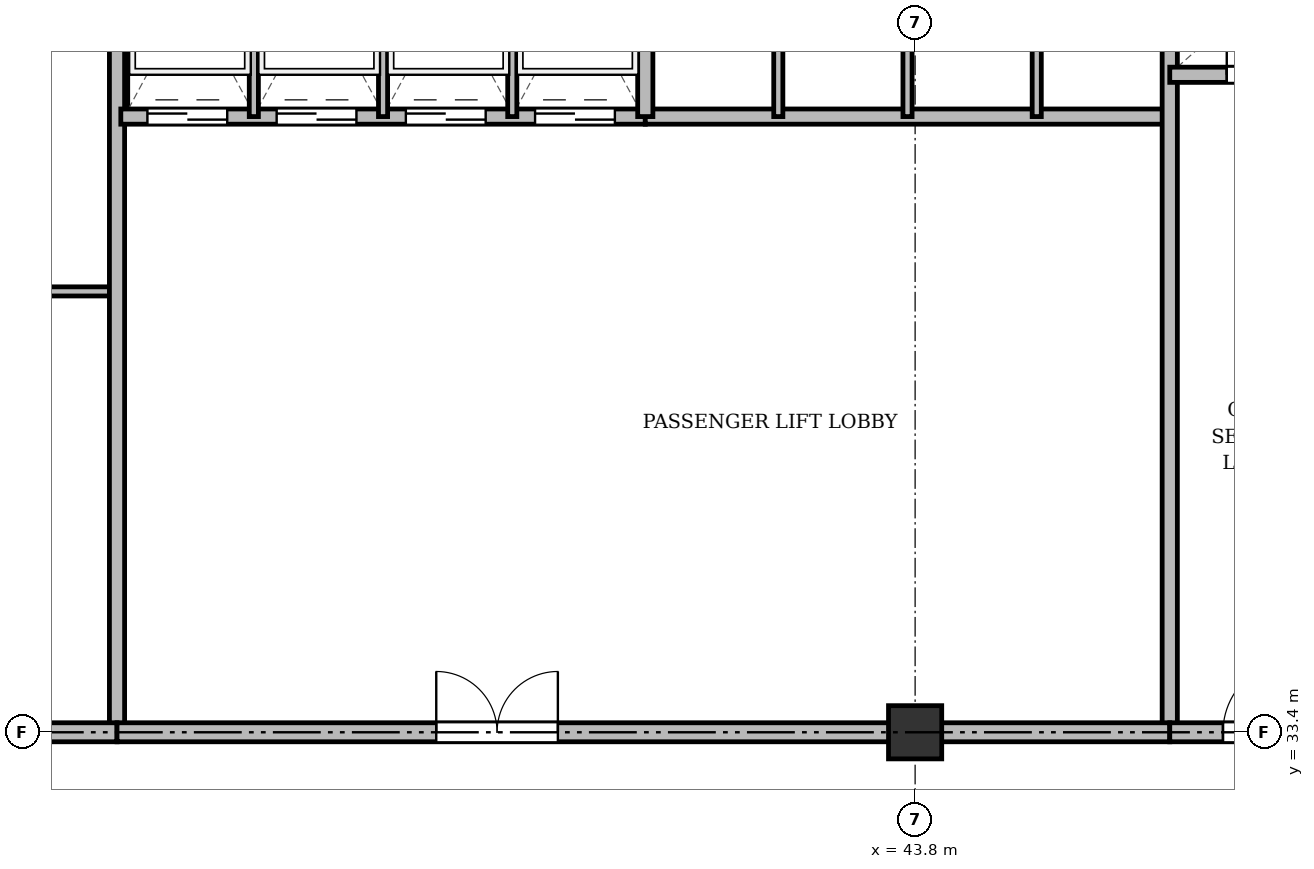
"""IFC4 building model, lengths in metres.
Left out: names, types, materials, properties, quantities, classifications, styles, units other than length and angle.
Written with IfcOpenShell. Run it as: python <this file> out.ifc"""

import sys

from ifc_helpers import new_model, si_unit, direction, frame, frame_2d, origin, origin_2d, place, context, subcontext, project, spatial, rectangle, extrude, source, transform, mapped, element, fill, save


model = new_model("IFC4")
c1 = context("Model", 3, precision=1e-05, world=origin(), true_north=direction((0.0, 1.0)))
c2 = subcontext(c1, "Body", "Model", "MODEL_VIEW")
j1 = project(units=[si_unit("LENGTHUNIT", "METRE"), si_unit("PLANEANGLEUNIT", "RADIAN")], contexts=[c1])
p1 = place(None, origin())
s1 = spatial("IfcSite", under=j1, at=p1, CompositionType="ELEMENT")
p2 = place(p1, origin())
s2 = spatial("IfcBuilding", under=s1, at=p2, CompositionType="ELEMENT")
p3 = place(p2, frame((0.0, 0.0, 135.7)))
s3 = spatial("IfcBuildingStorey", under=s2, at=p3, CompositionType="ELEMENT", Elevation=135.7)
m1 = source(origin(), c2, "Body", "SweptSolid", [
    extrude(rectangle(XDim=0.7, YDim=0.7, at=origin_2d()), origin(), (0.0, 0.0, 1.0), 3.6),
])
p4 = place(p3, frame((43.8, 33.4, 0.0), z_axis=(0.0, 0.0, 1.0), x_axis=(1.0, 0.0, 0.0)))
e1 = element("IfcColumn", 1, at=p4, inside=s3, PredefinedType="COLUMN", context=c2, shape_type="MappedRepresentation", body=[
    mapped(m1, transform((0.0, 0.0, 0.0), x_axis=(1.0, 0.0, 0.0), y_axis=(0.0, 1.0, 0.0), z_axis=(0.0, 0.0, 1.0), scale=1.0)),
])
p5 = place(p3, frame((26.3, 39.2, 0.0), z_axis=(0.0, 0.0, 1.0), x_axis=(1.0, 0.0, 0.0)))
e2 = element("IfcWall", 2, at=p5, inside=s3, PredefinedType="PARTITIONING", context=c2, shape_type="SweptSolid", body=[
    extrude(rectangle(XDim=7.0, YDim=0.12, at=frame_2d((3.5, 0.0))), origin(), (0.0, 0.0, 1.0), 2.85),
])
p6 = place(p5, frame((2.6, 0.0, 0.0)))
e3 = element("IfcOpeningElement", 3, at=p6, cuts=e2, PredefinedType="OPENING", context=c2, shape_type="SweptSolid", body=[
    extrude(rectangle(XDim=0.95, YDim=2.15, at=frame_2d((0.475, 1.075))), frame((0.0, 0.07, 0.0), z_axis=(0.0, -1.0, 0.0), x_axis=(1.0, 0.0, 0.0)), (0.0, 0.0, 1.0), 0.14),
])
p7 = place(p3, frame((33.3, 33.4, 0.0), z_axis=(0.0, 0.0, 1.0), x_axis=(0.0, 1.0, 0.0)))
e4 = element("IfcWall", 4, at=p7, inside=s3, PredefinedType="SOLIDWALL", context=c2, shape_type="SweptSolid", body=[
    extrude(rectangle(XDim=11.3, YDim=0.2, at=frame_2d((5.65, 0.0))), origin(), (0.0, 0.0, 1.0), 2.75),
])
p8 = place(p3, frame((33.35, 41.5, 0.0), z_axis=(0.0, 0.0, 1.0), x_axis=(1.0, 0.0, 0.0)))
e5 = element("IfcWall", 5, at=p8, inside=s3, PredefinedType="SOLIDWALL", context=c2, shape_type="SweptSolid", body=[
    extrude(rectangle(XDim=6.9, YDim=0.2, at=frame_2d((3.45, 0.0))), origin(), (0.0, 0.0, 1.0), 3.35),
])
p9 = place(p8, frame((0.35, 0.0, 0.0)))
e6 = element("IfcOpeningElement", 6, at=p9, cuts=e5, PredefinedType="OPENING", context=c2, shape_type="SweptSolid", body=[
    extrude(rectangle(XDim=1.05, YDim=2.15, at=frame_2d((0.525, 1.075))), frame((0.0, 0.11, 0.0), z_axis=(0.0, -1.0, 0.0), x_axis=(1.0, 0.0, 0.0)), (0.0, 0.0, 1.0), 0.22),
])
p10 = place(p8, frame((2.05, 0.0, 0.0)))
e7 = element("IfcOpeningElement", 7, at=p10, cuts=e5, PredefinedType="OPENING", context=c2, shape_type="SweptSolid", body=[
    extrude(rectangle(XDim=1.05, YDim=2.15, at=frame_2d((0.525, 1.075))), frame((0.0, 0.11, 0.0), z_axis=(0.0, -1.0, 0.0), x_axis=(1.0, 0.0, 0.0)), (0.0, 0.0, 1.0), 0.22),
])
p11 = place(p8, frame((3.75, 0.0, 0.0)))
e8 = element("IfcOpeningElement", 8, at=p11, cuts=e5, PredefinedType="OPENING", context=c2, shape_type="SweptSolid", body=[
    extrude(rectangle(XDim=1.05, YDim=2.15, at=frame_2d((0.525, 1.075))), frame((0.0, 0.11, 0.0), z_axis=(0.0, -1.0, 0.0), x_axis=(1.0, 0.0, 0.0)), (0.0, 0.0, 1.0), 0.22),
])
p12 = place(p8, frame((5.45, 0.0, 0.0)))
e9 = element("IfcOpeningElement", 9, at=p12, cuts=e5, PredefinedType="OPENING", context=c2, shape_type="SweptSolid", body=[
    extrude(rectangle(XDim=1.05, YDim=2.15, at=frame_2d((0.525, 1.075))), frame((0.0, 0.11, 0.0), z_axis=(0.0, -1.0, 0.0), x_axis=(1.0, 0.0, 0.0)), (0.0, 0.0, 1.0), 0.22),
])
for number, where, z_axis, x_axis in (
    (10, (35.1, 41.5, 0.0), (0.0, 0.0, 1.0), (0.0, 1.0, 0.0)),
    (11, (36.8, 41.5, 0.0), (0.0, 0.0, 1.0), (0.0, 1.0, 0.0)),
    (12, (38.5, 41.5, 0.0), (0.0, 0.0, 1.0), (0.0, 1.0, 0.0)),
):
    element("IfcWall", number, at=place(p3, frame(where, z_axis=z_axis, x_axis=x_axis)), inside=s3, PredefinedType="PARTITIONING", context=c2, shape_type="SweptSolid", body=[
        extrude(rectangle(XDim=3.2, YDim=0.12, at=frame_2d((1.6, 0.0))), origin(), (0.0, 0.0, 1.0), 3.35),
    ])
p13 = place(p3, frame((40.25, 41.5, 0.0), z_axis=(0.0, 0.0, 1.0), x_axis=(1.0, 0.0, 0.0)))
e13 = element("IfcWall", 13, at=p13, inside=s3, PredefinedType="SOLIDWALL", context=c2, shape_type="SweptSolid", body=[
    extrude(rectangle(XDim=6.9, YDim=0.2, at=frame_2d((3.45, 0.0))), origin(), (0.0, 0.0, 1.0), 2.85),
])
p14 = place(p3, frame((40.25, 41.5, 0.0), z_axis=(0.0, 0.0, 1.0), x_axis=(0.0, 1.0, 0.0)))
e14 = element("IfcWall", 14, at=p14, inside=s3, PredefinedType="SOLIDWALL", context=c2, shape_type="SweptSolid", body=[
    extrude(rectangle(XDim=3.2, YDim=0.2, at=frame_2d((1.6, 0.0))), origin(), (0.0, 0.0, 1.0), 3.35),
])
p15 = place(p3, frame((42.0, 41.5, 0.0), z_axis=(0.0, 0.0, 1.0), x_axis=(0.0, 1.0, 0.0)))
e15 = element("IfcWall", 15, at=p15, inside=s3, PredefinedType="PARTITIONING", context=c2, shape_type="SweptSolid", body=[
    extrude(rectangle(XDim=3.2, YDim=0.12, at=frame_2d((1.6, 0.0))), origin(), (0.0, 0.0, 1.0), 3.35),
])
p16 = place(p3, frame((43.7, 41.5, 0.0), z_axis=(0.0, 0.0, 1.0), x_axis=(0.0, 1.0, 0.0)))
e16 = element("IfcWall", 16, at=p16, inside=s3, PredefinedType="PARTITIONING", context=c2, shape_type="SweptSolid", body=[
    extrude(rectangle(XDim=3.2, YDim=0.12, at=frame_2d((1.6, 0.0))), origin(), (0.0, 0.0, 1.0), 2.85),
])
p17 = place(p3, frame((45.4, 41.5, 0.0), z_axis=(0.0, 0.0, 1.0), x_axis=(0.0, 1.0, 0.0)))
e17 = element("IfcWall", 17, at=p17, inside=s3, PredefinedType="PARTITIONING", context=c2, shape_type="SweptSolid", body=[
    extrude(rectangle(XDim=3.2, YDim=0.12, at=frame_2d((1.6, 0.0))), origin(), (0.0, 0.0, 1.0), 3.35),
])
p18 = place(p3, frame((47.15, 33.4, 0.0), z_axis=(0.0, 0.0, 1.0), x_axis=(0.0, 1.0, 0.0)))
e18 = element("IfcWall", 18, at=p18, inside=s3, PredefinedType="SOLIDWALL", context=c2, shape_type="SweptSolid", body=[
    extrude(rectangle(XDim=11.3, YDim=0.2, at=frame_2d((5.65, 0.0))), origin(), (0.0, 0.0, 1.0), 2.75),
])
p19 = place(p3, frame((26.3, 33.4, 0.0), z_axis=(0.0, 0.0, 1.0), x_axis=(1.0, 0.0, 0.0)))
e19 = element("IfcWall", 19, at=p19, inside=s3, PredefinedType="PARTITIONING", context=c2, shape_type="SweptSolid", body=[
    extrude(rectangle(XDim=7.0, YDim=0.25, at=frame_2d((3.5, 0.0))), origin(), (0.0, 0.0, 1.0), 2.75),
])
p20 = place(p19, frame((1.35, 0.0, 0.0)))
e20 = element("IfcOpeningElement", 20, at=p20, cuts=e19, PredefinedType="OPENING", context=c2, shape_type="SweptSolid", body=[
    extrude(rectangle(XDim=0.95, YDim=2.15, at=frame_2d((0.475, 1.075))), frame((0.0, 0.135, 0.0), z_axis=(0.0, -1.0, 0.0), x_axis=(1.0, 0.0, 0.0)), (0.0, 0.0, 1.0), 0.27),
])
p21 = place(p3, frame((33.3, 33.4, 0.0), z_axis=(0.0, 0.0, 1.0), x_axis=(1.0, 0.0, 0.0)))
e21 = element("IfcWall", 21, at=p21, inside=s3, PredefinedType="PARTITIONING", context=c2, shape_type="SweptSolid", body=[
    extrude(rectangle(XDim=13.85, YDim=0.25, at=frame_2d((6.925, 0.0))), origin(), (0.0, 0.0, 1.0), 2.75),
])
p22 = place(p21, frame((4.2, 0.0, 0.0)))
e22 = element("IfcOpeningElement", 22, at=p22, cuts=e21, PredefinedType="OPENING", context=c2, shape_type="SweptSolid", body=[
    extrude(rectangle(XDim=1.6, YDim=2.2, at=frame_2d((0.8, 1.1))), frame((0.0, 0.135, 0.0), z_axis=(0.0, -1.0, 0.0), x_axis=(1.0, 0.0, 0.0)), (0.0, 0.0, 1.0), 0.27),
])
p23 = place(p3, frame((47.15, 42.05, 0.0), z_axis=(0.0, 0.0, 1.0), x_axis=(1.0, 0.0, 0.0)))
e23 = element("IfcWall", 23, at=p23, inside=s3, PredefinedType="SOLIDWALL", context=c2, shape_type="SweptSolid", body=[
    extrude(rectangle(XDim=7.85, YDim=0.2, at=frame_2d((3.925, 0.0))), origin(), (0.0, 0.0, 1.0), 2.85),
])
p24 = place(p23, frame((0.75, 0.0, 0.0)))
e24 = element("IfcOpeningElement", 24, at=p24, cuts=e23, PredefinedType="OPENING", context=c2, shape_type="SweptSolid", body=[
    extrude(rectangle(XDim=0.9, YDim=2.1, at=frame_2d((0.45, 1.05))), frame((0.0, 0.11, 0.0), z_axis=(0.0, -1.0, 0.0), x_axis=(1.0, 0.0, 0.0)), (0.0, 0.0, 1.0), 0.22),
])
p25 = place(p23, frame((3.85, 0.0, 0.0)))
e25 = element("IfcOpeningElement", 25, at=p25, cuts=e23, PredefinedType="OPENING", context=c2, shape_type="SweptSolid", body=[
    extrude(rectangle(XDim=0.9, YDim=2.1, at=frame_2d((0.45, 1.05))), frame((0.0, 0.11, 0.0), z_axis=(0.0, -1.0, 0.0), x_axis=(1.0, 0.0, 0.0)), (0.0, 0.0, 1.0), 0.22),
])
p26 = place(p3, frame((47.15, 33.4, 0.0), z_axis=(0.0, 0.0, 1.0), x_axis=(1.0, 0.0, 0.0)))
e26 = element("IfcWall", 26, at=p26, inside=s3, PredefinedType="PARTITIONING", context=c2, shape_type="SweptSolid", body=[
    extrude(rectangle(XDim=11.15, YDim=0.25, at=frame_2d((5.575, 0.0))), origin(), (0.0, 0.0, 1.0), 2.75),
])
p27 = place(p26, frame((0.7, 0.0, 0.0)))
e27 = element("IfcOpeningElement", 27, at=p27, cuts=e26, PredefinedType="OPENING", context=c2, shape_type="SweptSolid", body=[
    extrude(rectangle(XDim=0.95, YDim=2.15, at=frame_2d((0.475, 1.075))), frame((0.0, 0.135, 0.0), z_axis=(0.0, -1.0, 0.0), x_axis=(1.0, 0.0, 0.0)), (0.0, 0.0, 1.0), 0.27),
])
p28 = place(p26, frame((6.0, 0.0, 0.0)))
e28 = element("IfcOpeningElement", 28, at=p28, cuts=e26, PredefinedType="OPENING", context=c2, shape_type="SweptSolid", body=[
    extrude(rectangle(XDim=1.2, YDim=2.15, at=frame_2d((0.6, 1.075))), frame((0.0, 0.135, 0.0), z_axis=(0.0, -1.0, 0.0), x_axis=(1.0, 0.0, 0.0)), (0.0, 0.0, 1.0), 0.27),
])
m2 = source(origin(), c2, "Body", "SweptSolid", [
    extrude(rectangle(XDim=1.05, YDim=2.15, at=frame_2d((0.525, 1.075))), frame((0.0, 0.025, 0.0), z_axis=(0.0, -1.0, 0.0), x_axis=(1.0, 0.0, 0.0)), (0.0, 0.0, 1.0), 0.05),
])
p29 = place(p9, origin())
e29 = element("IfcDoor", 29, at=p29, inside=s3, OperationType="DOUBLE_DOOR_SLIDING", PredefinedType="DOOR", context=c2, shape_type="MappedRepresentation", body=[
    mapped(m2, transform((0.0, 0.0, 0.0), x_axis=(1.0, 0.0, 0.0), y_axis=(0.0, 1.0, 0.0), z_axis=(0.0, 0.0, 1.0), scale=1.0)),
])
fill(e6, e29)
p30 = place(p10, origin())
e30 = element("IfcDoor", 30, at=p30, inside=s3, OperationType="DOUBLE_DOOR_SLIDING", PredefinedType="DOOR", context=c2, shape_type="MappedRepresentation", body=[
    mapped(m2, transform((0.0, 0.0, 0.0), x_axis=(1.0, 0.0, 0.0), y_axis=(0.0, 1.0, 0.0), z_axis=(0.0, 0.0, 1.0), scale=1.0)),
])
fill(e7, e30)
p31 = place(p11, origin())
e31 = element("IfcDoor", 31, at=p31, inside=s3, OperationType="DOUBLE_DOOR_SLIDING", PredefinedType="DOOR", context=c2, shape_type="MappedRepresentation", body=[
    mapped(m2, transform((0.0, 0.0, 0.0), x_axis=(1.0, 0.0, 0.0), y_axis=(0.0, 1.0, 0.0), z_axis=(0.0, 0.0, 1.0), scale=1.0)),
])
fill(e8, e31)
p32 = place(p12, origin())
e32 = element("IfcDoor", 32, at=p32, inside=s3, OperationType="DOUBLE_DOOR_SLIDING", PredefinedType="DOOR", context=c2, shape_type="MappedRepresentation", body=[
    mapped(m2, transform((0.0, 0.0, 0.0), x_axis=(1.0, 0.0, 0.0), y_axis=(0.0, 1.0, 0.0), z_axis=(0.0, 0.0, 1.0), scale=1.0)),
])
fill(e9, e32)
m3 = source(origin(), c2, "Body", "SweptSolid", [
    extrude(rectangle(XDim=1.6, YDim=2.2, at=frame_2d((0.8, 1.1))), frame((0.0, 0.025, 0.0), z_axis=(0.0, -1.0, 0.0), x_axis=(1.0, 0.0, 0.0)), (0.0, 0.0, 1.0), 0.05),
])
p33 = place(p22, origin())
e33 = element("IfcDoor", 33, at=p33, inside=s3, OperationType="DOUBLE_DOOR_SINGLE_SWING", PredefinedType="DOOR", context=c2, shape_type="MappedRepresentation", body=[
    mapped(m3, transform((0.0, 0.0, 0.0), x_axis=(1.0, 0.0, 0.0), y_axis=(0.0, 1.0, 0.0), z_axis=(0.0, 0.0, 1.0), scale=1.0)),
])
fill(e22, e33)
m4 = source(origin(), c2, "Body", "SweptSolid", [
    extrude(rectangle(XDim=0.9, YDim=2.1, at=frame_2d((0.45, 1.05))), frame((0.0, 0.025, 0.0), z_axis=(0.0, -1.0, 0.0), x_axis=(1.0, 0.0, 0.0)), (0.0, 0.0, 1.0), 0.05),
])
p34 = place(p24, origin())
e34 = element("IfcDoor", 34, at=p34, inside=s3, OperationType="SINGLE_SWING_LEFT", PredefinedType="DOOR", context=c2, shape_type="MappedRepresentation", body=[
    mapped(m4, transform((0.0, 0.0, 0.0), x_axis=(1.0, 0.0, 0.0), y_axis=(0.0, 1.0, 0.0), z_axis=(0.0, 0.0, 1.0), scale=1.0)),
])
fill(e24, e34)
m5 = source(origin(), c2, "Body", "SweptSolid", [
    extrude(rectangle(XDim=0.95, YDim=2.15, at=frame_2d((0.475, 1.075))), frame((0.0, 0.025, 0.0), z_axis=(0.0, -1.0, 0.0), x_axis=(1.0, 0.0, 0.0)), (0.0, 0.0, 1.0), 0.05),
])
p35 = place(p27, origin())
e35 = element("IfcDoor", 35, at=p35, inside=s3, OperationType="SINGLE_SWING_RIGHT", PredefinedType="DOOR", context=c2, shape_type="MappedRepresentation", body=[
    mapped(m5, transform((0.0, 0.0, 0.0), x_axis=(1.0, 0.0, 0.0), y_axis=(0.0, 1.0, 0.0), z_axis=(0.0, 0.0, 1.0), scale=1.0)),
])
fill(e27, e35)
save(model, sys.argv[1])
